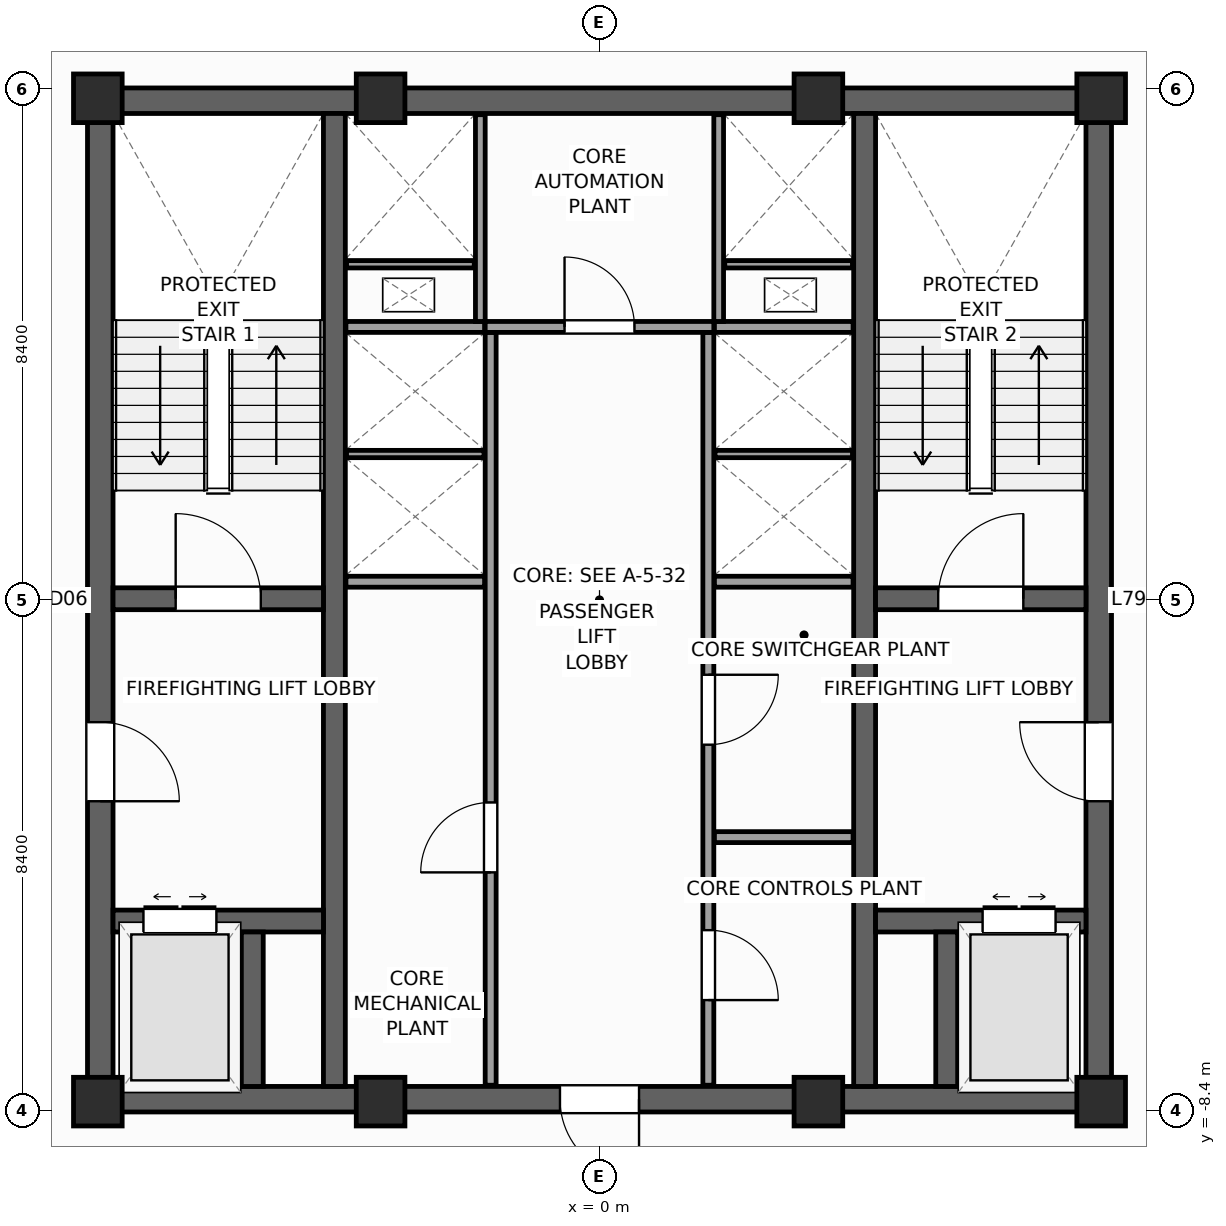
"""IFC4 building model, lengths in metres.
Left out: names, types, materials, properties, quantities, classifications, styles, units other than length and angle.
Written with IfcOpenShell. Run it as: python <this file> out.ifc"""

import sys

from ifc_helpers import new_model, si_unit, direction, frame, frame_2d, origin, origin_2d, place, context, subcontext, project, spatial, rectangle, extrude, source, transform, mapped, element, fill, save


model = new_model("IFC4")
c1 = context("Model", 3, precision=1e-05, world=origin(), true_north=direction((0.0, 1.0)))
c2 = subcontext(c1, "Body", "Model", "MODEL_VIEW")
j1 = project(units=[si_unit("LENGTHUNIT", "METRE"), si_unit("PLANEANGLEUNIT", "RADIAN")], contexts=[c1])
p1 = place(None, origin())
s1 = spatial("IfcSite", under=j1, at=p1, CompositionType="ELEMENT")
p2 = place(p1, origin())
s2 = spatial("IfcBuilding", under=s1, at=p2, CompositionType="ELEMENT")
p3 = place(p2, frame((0.0, 0.0, 321.6)))
s3 = spatial("IfcBuildingStorey", under=s2, at=p3, CompositionType="ELEMENT", Elevation=321.6)
p4 = place(p3, frame((-8.42, -8.21, 0.0), z_axis=(0.0, 0.0, 1.0), x_axis=(1.0, 0.0, 0.0)))
e1 = element("IfcWall", 1, at=p4, inside=s3, PredefinedType="SHEAR", context=c2, shape_type="SweptSolid", body=[
    extrude(rectangle(XDim=16.84, YDim=0.42, at=frame_2d((8.42, 0.0))), origin(), (0.0, 0.0, 1.0), 4.0),
])
p5 = place(p4, frame((7.77, 0.0, 0.0)))
e2 = element("IfcOpeningElement", 2, at=p5, cuts=e1, PredefinedType="OPENING", context=c2, shape_type="SweptSolid", body=[
    extrude(rectangle(XDim=1.3, YDim=2.2, at=frame_2d((0.65, 1.1))), frame((0.0, 0.22, 0.0), z_axis=(0.0, -1.0, 0.0), x_axis=(1.0, 0.0, 0.0)), (0.0, 0.0, 1.0), 0.44),
])
p6 = place(p3, frame((-8.42, 8.21, 0.0), z_axis=(0.0, 0.0, 1.0), x_axis=(1.0, 0.0, 0.0)))
e3 = element("IfcWall", 3, at=p6, inside=s3, PredefinedType="SHEAR", context=c2, shape_type="SweptSolid", body=[
    extrude(rectangle(XDim=16.84, YDim=0.42, at=frame_2d((8.42, 0.0))), origin(), (0.0, 0.0, 1.0), 4.0),
])
p7 = place(p3, frame((-8.21, -8.0, 0.0), z_axis=(0.0, 0.0, 1.0), x_axis=(0.0, 1.0, 0.0)))
e4 = element("IfcWall", 4, at=p7, inside=s3, PredefinedType="SHEAR", context=c2, shape_type="SweptSolid", body=[
    extrude(rectangle(XDim=16.0, YDim=0.42, at=frame_2d((8.0, 0.0))), origin(), (0.0, 0.0, 1.0), 4.0),
])
p8 = place(p7, frame((4.69, 0.0, 0.0)))
e5 = element("IfcOpeningElement", 5, at=p8, cuts=e4, PredefinedType="OPENING", context=c2, shape_type="SweptSolid", body=[
    extrude(rectangle(XDim=1.3, YDim=2.2, at=frame_2d((0.65, 1.1))), frame((0.0, 0.22, 0.0), z_axis=(0.0, -1.0, 0.0), x_axis=(1.0, 0.0, 0.0)), (0.0, 0.0, 1.0), 0.44),
])
p9 = place(p3, frame((8.21, -8.0, 0.0), z_axis=(0.0, 0.0, 1.0), x_axis=(0.0, 1.0, 0.0)))
e6 = element("IfcWall", 6, at=p9, inside=s3, PredefinedType="SHEAR", context=c2, shape_type="SweptSolid", body=[
    extrude(rectangle(XDim=16.0, YDim=0.42, at=frame_2d((8.0, 0.0))), origin(), (0.0, 0.0, 1.0), 4.0),
])
p10 = place(p9, frame((4.69, 0.0, 0.0)))
e7 = element("IfcOpeningElement", 7, at=p10, cuts=e6, PredefinedType="OPENING", context=c2, shape_type="SweptSolid", body=[
    extrude(rectangle(XDim=1.3, YDim=2.2, at=frame_2d((0.65, 1.1))), frame((0.0, 0.22, 0.0), z_axis=(0.0, -1.0, 0.0), x_axis=(1.0, 0.0, 0.0)), (0.0, 0.0, 1.0), 0.44),
])
for number, where, z_axis, x_axis in (
    (8, (-4.36, -8.0, 0.0), (0.0, 0.0, 1.0), (0.0, 1.0, 0.0)),
    (9, (4.36, -8.0, 0.0), (0.0, 0.0, 1.0), (0.0, 1.0, 0.0)),
):
    element("IfcWall", number, at=place(p3, frame(where, z_axis=z_axis, x_axis=x_axis)), inside=s3, PredefinedType="SHEAR", context=c2, shape_type="SweptSolid", body=[
        extrude(rectangle(XDim=16.0, YDim=0.36, at=frame_2d((8.0, 0.0))), origin(), (0.0, 0.0, 1.0), 4.0),
    ])
p11 = place(p3, frame((-8.0, 0.02, 0.0), z_axis=(0.0, 0.0, 1.0), x_axis=(1.0, 0.0, 0.0)))
e10 = element("IfcWall", 10, at=p11, inside=s3, PredefinedType="SHEAR", context=c2, shape_type="SweptSolid", body=[
    extrude(rectangle(XDim=3.46, YDim=0.36, at=frame_2d((1.73, 0.0))), origin(), (0.0, 0.0, 1.0), 4.0),
])
p12 = place(p11, frame((1.03, 0.0, 0.0)))
e11 = element("IfcOpeningElement", 11, at=p12, cuts=e10, PredefinedType="OPENING", context=c2, shape_type="SweptSolid", body=[
    extrude(rectangle(XDim=1.4, YDim=2.2, at=frame_2d((0.7, 1.1))), frame((0.0, 0.19, 0.0), z_axis=(0.0, -1.0, 0.0), x_axis=(1.0, 0.0, 0.0)), (0.0, 0.0, 1.0), 0.38),
])
p13 = place(p3, frame((4.54, 0.02, 0.0), z_axis=(0.0, 0.0, 1.0), x_axis=(1.0, 0.0, 0.0)))
e12 = element("IfcWall", 12, at=p13, inside=s3, PredefinedType="SHEAR", context=c2, shape_type="SweptSolid", body=[
    extrude(rectangle(XDim=3.46, YDim=0.36, at=frame_2d((1.73, 0.0))), origin(), (0.0, 0.0, 1.0), 4.0),
])
p14 = place(p13, frame((1.03, 0.0, 0.0)))
e13 = element("IfcOpeningElement", 13, at=p14, cuts=e12, PredefinedType="OPENING", context=c2, shape_type="SweptSolid", body=[
    extrude(rectangle(XDim=1.4, YDim=2.2, at=frame_2d((0.7, 1.1))), frame((0.0, 0.19, 0.0), z_axis=(0.0, -1.0, 0.0), x_axis=(1.0, 0.0, 0.0)), (0.0, 0.0, 1.0), 0.38),
])
p15 = place(p3, frame((-8.0, -5.28, 0.0), z_axis=(0.0, 0.0, 1.0), x_axis=(1.0, 0.0, 0.0)))
e14 = element("IfcWall", 14, at=p15, inside=s3, PredefinedType="SHEAR", context=c2, shape_type="SweptSolid", body=[
    extrude(rectangle(XDim=3.46, YDim=0.36, at=frame_2d((1.73, 0.0))), origin(), (0.0, 0.0, 1.0), 4.0),
])
p16 = place(p15, frame((0.5, 0.0, 0.0)))
e15 = element("IfcOpeningElement", 15, at=p16, cuts=e14, PredefinedType="OPENING", context=c2, shape_type="SweptSolid", body=[
    extrude(rectangle(XDim=1.2, YDim=2.25, at=frame_2d((0.6, 1.125))), frame((0.0, 0.19, 0.0), z_axis=(0.0, -1.0, 0.0), x_axis=(1.0, 0.0, 0.0)), (0.0, 0.0, 1.0), 0.38),
])
p17 = place(p3, frame((4.54, -5.28, 0.0), z_axis=(0.0, 0.0, 1.0), x_axis=(1.0, 0.0, 0.0)))
e16 = element("IfcWall", 16, at=p17, inside=s3, PredefinedType="SHEAR", context=c2, shape_type="SweptSolid", body=[
    extrude(rectangle(XDim=3.46, YDim=0.36, at=frame_2d((1.73, 0.0))), origin(), (0.0, 0.0, 1.0), 4.0),
])
p18 = place(p17, frame((1.76, 0.0, 0.0)))
e17 = element("IfcOpeningElement", 17, at=p18, cuts=e16, PredefinedType="OPENING", context=c2, shape_type="SweptSolid", body=[
    extrude(rectangle(XDim=1.2, YDim=2.25, at=frame_2d((0.6, 1.125))), frame((0.0, 0.19, 0.0), z_axis=(0.0, -1.0, 0.0), x_axis=(1.0, 0.0, 0.0)), (0.0, 0.0, 1.0), 0.38),
])
for number, where, z_axis, x_axis in (
    (18, (-5.71, -8.0, 0.0), (0.0, 0.0, 1.0), (0.0, 1.0, 0.0)),
    (19, (5.71, -8.0, 0.0), (0.0, 0.0, 1.0), (0.0, 1.0, 0.0)),
):
    element("IfcWall", number, at=place(p3, frame(where, z_axis=z_axis, x_axis=x_axis)), inside=s3, PredefinedType="SHEAR", context=c2, shape_type="SweptSolid", body=[
        extrude(rectangle(XDim=2.54, YDim=0.36, at=frame_2d((1.27, 0.0))), origin(), (0.0, 0.0, 1.0), 4.0),
    ])
m1 = source(origin(), c2, "Body", "SweptSolid", [
    extrude(rectangle(XDim=0.8, YDim=0.8, at=origin_2d()), origin(), (0.0, 0.0, 1.0), 4.0),
])
for number, where, z_axis, x_axis in (
    (20, (-8.25, -8.25, 0.0), (0.0, 0.0, 1.0), (1.0, 0.0, 0.0)),
    (21, (8.25, -8.25, 0.0), (0.0, 0.0, 1.0), (1.0, 0.0, 0.0)),
    (22, (8.25, 8.25, 0.0), (0.0, 0.0, 1.0), (1.0, 0.0, 0.0)),
    (23, (-8.25, 8.25, 0.0), (0.0, 0.0, 1.0), (1.0, 0.0, 0.0)),
    (24, (-3.6, -8.25, 0.0), (0.0, 0.0, 1.0), (1.0, 0.0, 0.0)),
    (25, (3.6, -8.25, 0.0), (0.0, 0.0, 1.0), (1.0, 0.0, 0.0)),
    (26, (-3.6, 8.25, 0.0), (0.0, 0.0, 1.0), (1.0, 0.0, 0.0)),
    (27, (3.6, 8.25, 0.0), (0.0, 0.0, 1.0), (1.0, 0.0, 0.0)),
):
    element("IfcColumn", number, at=place(p3, frame(where, z_axis=z_axis, x_axis=x_axis)), inside=s3, PredefinedType="PILASTER", context=c2, shape_type="MappedRepresentation", body=[
        mapped(m1, transform((0.0, 0.0, 0.0), scale=1.0)),
    ])
p19 = place(p3, frame((-1.79, -7.98, 0.0), z_axis=(0.0, 0.0, 1.0), x_axis=(0.0, 1.0, 0.0)))
e28 = element("IfcWall", 28, at=p19, inside=s3, PredefinedType="PARTITIONING", context=c2, shape_type="SweptSolid", body=[
    extrude(rectangle(XDim=12.38, YDim=0.18, at=frame_2d((6.19, 0.0))), origin(), (0.0, 0.0, 1.0), 3.7),
])
p20 = place(p19, frame((3.5, 0.0, 0.0)))
e29 = element("IfcOpeningElement", 29, at=p20, cuts=e28, PredefinedType="OPENING", context=c2, shape_type="SweptSolid", body=[
    extrude(rectangle(XDim=1.15, YDim=2.25, at=frame_2d((0.575, 1.125))), frame((0.0, 0.1, 0.0), z_axis=(0.0, -1.0, 0.0), x_axis=(1.0, 0.0, 0.0)), (0.0, 0.0, 1.0), 0.2),
])
p21 = place(p3, frame((1.79, -7.98, 0.0), z_axis=(0.0, 0.0, 1.0), x_axis=(0.0, 1.0, 0.0)))
e30 = element("IfcWall", 30, at=p21, inside=s3, PredefinedType="PARTITIONING", context=c2, shape_type="SweptSolid", body=[
    extrude(rectangle(XDim=12.38, YDim=0.18, at=frame_2d((6.19, 0.0))), origin(), (0.0, 0.0, 1.0), 3.7),
])
p22 = place(p21, frame((1.4, 0.0, 0.0)))
e31 = element("IfcOpeningElement", 31, at=p22, cuts=e30, PredefinedType="OPENING", context=c2, shape_type="SweptSolid", body=[
    extrude(rectangle(XDim=1.15, YDim=2.25, at=frame_2d((0.575, 1.125))), frame((0.0, 0.1, 0.0), z_axis=(0.0, -1.0, 0.0), x_axis=(1.0, 0.0, 0.0)), (0.0, 0.0, 1.0), 0.2),
])
p23 = place(p21, frame((5.6, 0.0, 0.0)))
e32 = element("IfcOpeningElement", 32, at=p23, cuts=e30, PredefinedType="OPENING", context=c2, shape_type="SweptSolid", body=[
    extrude(rectangle(XDim=1.15, YDim=2.25, at=frame_2d((0.575, 1.125))), frame((0.0, 0.1, 0.0), z_axis=(0.0, -1.0, 0.0), x_axis=(1.0, 0.0, 0.0)), (0.0, 0.0, 1.0), 0.2),
])
p24 = place(p3, frame((-1.88, 4.49, 0.0), z_axis=(0.0, 0.0, 1.0), x_axis=(1.0, 0.0, 0.0)))
e33 = element("IfcWall", 33, at=p24, inside=s3, PredefinedType="PARTITIONING", context=c2, shape_type="SweptSolid", body=[
    extrude(rectangle(XDim=3.76, YDim=0.18, at=frame_2d((1.88, 0.0))), origin(), (0.0, 0.0, 1.0), 3.7),
])
p25 = place(p24, frame((1.305, 0.0, 0.0)))
e34 = element("IfcOpeningElement", 34, at=p25, cuts=e33, PredefinedType="OPENING", context=c2, shape_type="SweptSolid", body=[
    extrude(rectangle(XDim=1.15, YDim=2.25, at=frame_2d((0.575, 1.125))), frame((0.0, 0.1, 0.0), z_axis=(0.0, -1.0, 0.0), x_axis=(1.0, 0.0, 0.0)), (0.0, 0.0, 1.0), 0.2),
])
for number, where, z_axis, x_axis in (
    (35, (1.89, -3.9, 0.0), (0.0, 0.0, 1.0), (1.0, 0.0, 0.0)),
    (36, (-4.17, 0.3, 0.0), (0.0, 0.0, 1.0), (1.0, 0.0, 0.0)),
    (37, (1.89, 0.3, 0.0), (0.0, 0.0, 1.0), (1.0, 0.0, 0.0)),
    (38, (-4.17, 4.49, 0.0), (0.0, 0.0, 1.0), (1.0, 0.0, 0.0)),
    (39, (1.89, 4.49, 0.0), (0.0, 0.0, 1.0), (1.0, 0.0, 0.0)),
):
    element("IfcWall", number, at=place(p3, frame(where, z_axis=z_axis, x_axis=x_axis)), inside=s3, PredefinedType="PARTITIONING", context=c2, shape_type="SweptSolid", body=[
        extrude(rectangle(XDim=2.28, YDim=0.18, at=frame_2d((1.14, 0.0))), origin(), (0.0, 0.0, 1.0), 3.7),
    ])
for number, where, z_axis, x_axis in (
    (40, (-4.16, 2.4, 0.0), (0.0, 0.0, 1.0), (1.0, 0.0, 0.0)),
    (41, (1.9, 2.4, 0.0), (0.0, 0.0, 1.0), (1.0, 0.0, 0.0)),
):
    element("IfcWall", number, at=place(p3, frame(where, z_axis=z_axis, x_axis=x_axis)), inside=s3, PredefinedType="PARTITIONING", context=c2, shape_type="SweptSolid", body=[
        extrude(rectangle(XDim=2.26, YDim=0.12, at=frame_2d((1.13, 0.0))), origin(), (0.0, 0.0, 1.0), 3.7),
    ])
for number, where, z_axis, x_axis in (
    (42, (-1.96, 4.58, 0.0), (0.0, 0.0, 1.0), (0.0, 1.0, 0.0)),
    (43, (1.96, 4.58, 0.0), (0.0, 0.0, 1.0), (0.0, 1.0, 0.0)),
):
    element("IfcWall", number, at=place(p3, frame(where, z_axis=z_axis, x_axis=x_axis)), inside=s3, PredefinedType="PARTITIONING", context=c2, shape_type="SweptSolid", body=[
        extrude(rectangle(XDim=3.4, YDim=0.16, at=frame_2d((1.7, 0.0))), origin(), (0.0, 0.0, 1.0), 3.7),
    ])
for number, where, z_axis, x_axis in (
    (44, (-4.16, 5.52, 0.0), (0.0, 0.0, 1.0), (1.0, 0.0, 0.0)),
    (45, (2.06, 5.52, 0.0), (0.0, 0.0, 1.0), (1.0, 0.0, 0.0)),
):
    element("IfcWall", number, at=place(p3, frame(where, z_axis=z_axis, x_axis=x_axis)), inside=s3, PredefinedType="PARTITIONING", context=c2, shape_type="SweptSolid", body=[
        extrude(rectangle(XDim=2.1, YDim=0.12, at=frame_2d((1.05, 0.0))), origin(), (0.0, 0.0, 1.0), 3.7),
    ])
m2 = source(origin(), c2, "Body", "SweptSolid", [
    extrude(rectangle(XDim=1.4, YDim=2.2, at=frame_2d((0.7, 1.1))), frame((0.0, 0.025, 0.0), z_axis=(0.0, -1.0, 0.0), x_axis=(1.0, 0.0, 0.0)), (0.0, 0.0, 1.0), 0.05),
])
p26 = place(p12, origin())
e46 = element("IfcDoor", 46, at=p26, inside=s3, OperationType="SINGLE_SWING_LEFT", PredefinedType="DOOR", context=c2, shape_type="MappedRepresentation", body=[
    mapped(m2, transform((0.0, 0.0, 0.0), scale=1.0)),
])
fill(e11, e46)
p27 = place(p14, origin())
e47 = element("IfcDoor", 47, at=p27, inside=s3, OperationType="SINGLE_SWING_RIGHT", PredefinedType="DOOR", context=c2, shape_type="MappedRepresentation", body=[
    mapped(m2, transform((0.0, 0.0, 0.0), scale=1.0)),
])
fill(e13, e47)
m3 = source(origin(), c2, "Body", "SweptSolid", [
    extrude(rectangle(XDim=1.3, YDim=2.2, at=frame_2d((0.65, 1.1))), frame((0.0, 0.025, 0.0), z_axis=(0.0, -1.0, 0.0), x_axis=(1.0, 0.0, 0.0)), (0.0, 0.0, 1.0), 0.05),
])
p28 = place(p8, frame((1.3, 0.0, 0.0), z_axis=(0.0, 0.0, 1.0), x_axis=(-1.0, 0.0, 0.0)))
e48 = element("IfcDoor", 48, at=p28, inside=s3, OperationType="SINGLE_SWING_LEFT", PredefinedType="DOOR", context=c2, shape_type="MappedRepresentation", body=[
    mapped(m3, transform((0.0, 0.0, 0.0), scale=1.0)),
])
fill(e5, e48)
p29 = place(p10, origin())
e49 = element("IfcDoor", 49, at=p29, inside=s3, OperationType="SINGLE_SWING_RIGHT", PredefinedType="DOOR", context=c2, shape_type="MappedRepresentation", body=[
    mapped(m3, transform((0.0, 0.0, 0.0), scale=1.0)),
])
fill(e7, e49)
p30 = place(p5, frame((1.3, 0.0, 0.0), z_axis=(0.0, 0.0, 1.0), x_axis=(-1.0, 0.0, 0.0)))
e50 = element("IfcDoor", 50, at=p30, inside=s3, OperationType="SINGLE_SWING_RIGHT", PredefinedType="DOOR", context=c2, shape_type="MappedRepresentation", body=[
    mapped(m3, transform((0.0, 0.0, 0.0), scale=1.0)),
])
fill(e2, e50)
m4 = source(origin(), c2, "Body", "SweptSolid", [
    extrude(rectangle(XDim=1.2, YDim=2.25, at=frame_2d((0.6, 1.125))), frame((0.0, 0.025, 0.0), z_axis=(0.0, -1.0, 0.0), x_axis=(1.0, 0.0, 0.0)), (0.0, 0.0, 1.0), 0.05),
])
p31 = place(p16, origin())
e51 = element("IfcDoor", 51, at=p31, inside=s3, OperationType="DOUBLE_DOOR_SLIDING", PredefinedType="DOOR", context=c2, shape_type="MappedRepresentation", body=[
    mapped(m4, transform((0.0, 0.0, 0.0), scale=1.0)),
])
fill(e15, e51)
p32 = place(p18, origin())
e52 = element("IfcDoor", 52, at=p32, inside=s3, OperationType="DOUBLE_DOOR_SLIDING", PredefinedType="DOOR", context=c2, shape_type="MappedRepresentation", body=[
    mapped(m4, transform((0.0, 0.0, 0.0), scale=1.0)),
])
fill(e17, e52)
m5 = source(origin(), c2, "Body", "SweptSolid", [
    extrude(rectangle(XDim=1.15, YDim=2.25, at=frame_2d((0.575, 1.125))), frame((0.0, 0.025, 0.0), z_axis=(0.0, -1.0, 0.0), x_axis=(1.0, 0.0, 0.0)), (0.0, 0.0, 1.0), 0.05),
])
p33 = place(p20, origin())
e53 = element("IfcDoor", 53, at=p33, inside=s3, OperationType="SINGLE_SWING_LEFT", PredefinedType="DOOR", context=c2, shape_type="MappedRepresentation", body=[
    mapped(m5, transform((0.0, 0.0, 0.0), scale=1.0)),
])
fill(e29, e53)
p34 = place(p22, frame((1.15, 0.0, 0.0), z_axis=(0.0, 0.0, 1.0), x_axis=(-1.0, 0.0, 0.0)))
e54 = element("IfcDoor", 54, at=p34, inside=s3, OperationType="SINGLE_SWING_LEFT", PredefinedType="DOOR", context=c2, shape_type="MappedRepresentation", body=[
    mapped(m5, transform((0.0, 0.0, 0.0), scale=1.0)),
])
fill(e31, e54)
p35 = place(p23, frame((1.15, 0.0, 0.0), z_axis=(0.0, 0.0, 1.0), x_axis=(-1.0, 0.0, 0.0)))
e55 = element("IfcDoor", 55, at=p35, inside=s3, OperationType="SINGLE_SWING_RIGHT", PredefinedType="DOOR", context=c2, shape_type="MappedRepresentation", body=[
    mapped(m5, transform((0.0, 0.0, 0.0), scale=1.0)),
])
fill(e32, e55)
p36 = place(p25, origin())
e56 = element("IfcDoor", 56, at=p36, inside=s3, OperationType="SINGLE_SWING_LEFT", PredefinedType="DOOR", context=c2, shape_type="MappedRepresentation", body=[
    mapped(m5, transform((0.0, 0.0, 0.0), scale=1.0)),
])
fill(e34, e56)
save(model, sys.argv[1])
